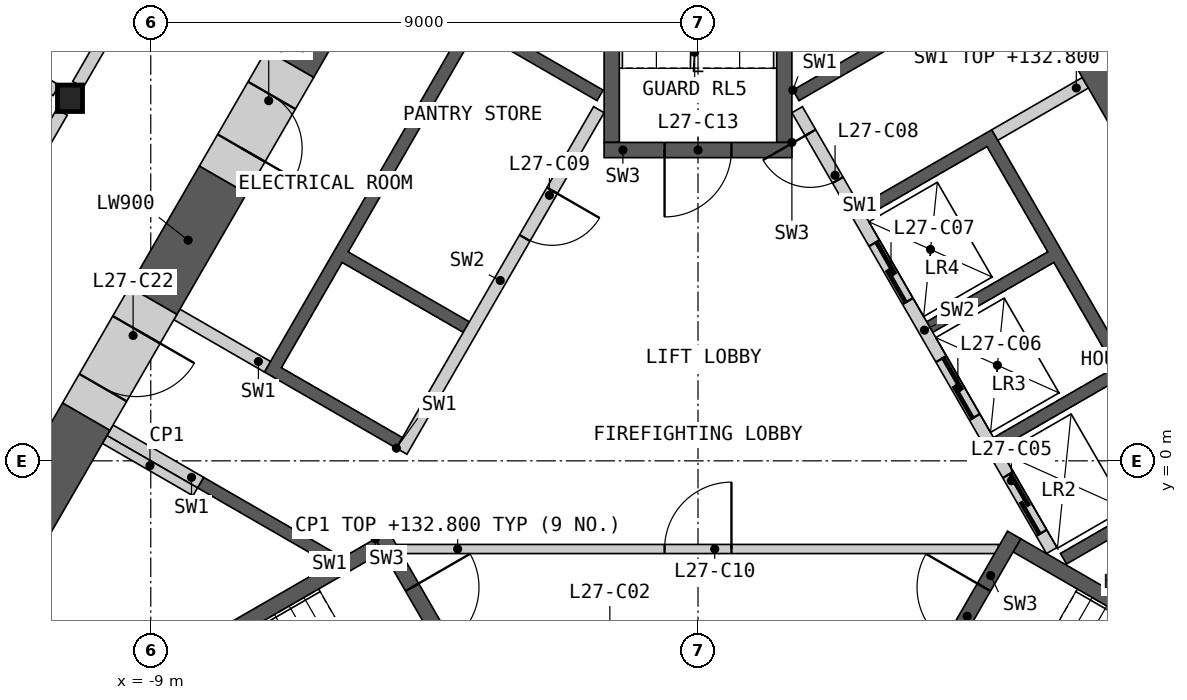
"""IFC4 building model, lengths in metres.
Left out: names, types, materials, properties, quantities, classifications, styles, units other than length and angle.
Written with IfcOpenShell. Run it as: python <this file> out.ifc"""

import sys

from ifc_helpers import new_model, si_unit, direction, frame, frame_2d, origin, origin_2d, place, context, subcontext, project, spatial, polyline, rectangle, i_section, outline, extrude, element, fill, save


model = new_model("IFC4")
c1 = context("Model", 3, precision=1e-05, world=origin(), true_north=direction((0.0, 1.0)))
c2 = subcontext(c1, "Body", "Model", "MODEL_VIEW")
j1 = project(units=[si_unit("LENGTHUNIT", "METRE"), si_unit("PLANEANGLEUNIT", "RADIAN")], contexts=[c1])
p1 = place(None, origin())
s1 = spatial("IfcSite", under=j1, at=p1, CompositionType="ELEMENT")
p2 = place(p1, origin())
s2 = spatial("IfcBuilding", under=s1, at=p2, CompositionType="ELEMENT")
p3 = place(p2, frame((0.0, 0.0, 129.0)))
s3 = spatial("IfcBuildingStorey", under=s2, at=p3, CompositionType="ELEMENT", Elevation=129.0)
p4 = place(p3, frame((-10.328, 5.963, 0.0), z_axis=(0.0, 0.0, 1.0), x_axis=(1.0, 0.0, 0.0)))
e1 = element("IfcColumn", 1, at=p4, inside=s3, PredefinedType="COLUMN", context=c2, shape_type="SweptSolid", body=[
    extrude(i_section(OverallWidth=0.412, OverallDepth=0.435, WebThickness=0.036, FlangeThickness=0.057, at=origin_2d()), origin(), (0.0, 0.0, 1.0), 4.2),
])
p5 = place(p3, origin())
e2 = element("IfcWall", 2, at=p5, inside=s3, PredefinedType="SHEAR", context=c2, shape_type="SweptSolid", body=[
    extrude(outline(polyline([(1.561, 6.097), (3.731, 7.35), (3.831, 7.177), (1.66, 5.924), (1.561, 6.097)])), origin(), (0.0, 0.0, 1.0), 3.8),
])
p6 = place(p3, origin())
e3 = element("IfcWall", 3, at=p6, inside=s3, PredefinedType="SHEAR", context=c2, shape_type="SweptSolid", body=[
    extrude(outline(polyline([(2.66, 4.192), (4.831, 5.445), (8.231, -0.444), (6.061, -1.697), (5.96, -1.524), (7.952, -0.374), (6.952, 1.358), (4.96, 0.208), (4.861, 0.381), (6.852, 1.531), (5.852, 3.263), (3.861, 2.113), (3.76, 2.287), (5.752, 3.437), (4.752, 5.169), (2.76, 4.019), (2.66, 4.192)])), origin(), (0.0, 0.0, 1.0), 3.8),
])
p7 = place(p3, frame((5.817, -1.476, 0.0), z_axis=(0.0, 0.0, 1.0), x_axis=(-0.500002616675, 0.866023893041, 0.0)))
e4 = element("IfcWall", 4, at=p7, inside=s3, PredefinedType="SOLIDWALL", context=c2, shape_type="SweptSolid", body=[
    extrude(rectangle(XDim=8.373, YDim=0.2, at=frame_2d((4.187, 0.0))), origin(), (0.0, 0.0, 1.0), 3.8),
])
p8 = place(p7, frame((0.337, 0.0, 0.0)))
e5 = element("IfcOpeningElement", 5, at=p8, cuts=e4, PredefinedType="OPENING", context=c2, shape_type="SweptSolid", body=[
    extrude(rectangle(XDim=1.1, YDim=2.1, at=frame_2d((0.55, 1.05))), frame((0.0, 0.11, 0.0), z_axis=(0.0, -1.0, 0.0), x_axis=(1.0, 0.0, 0.0)), (0.0, 0.0, 1.0), 0.22),
])
p9 = place(p7, frame((2.537, 0.0, 0.0)))
e6 = element("IfcOpeningElement", 6, at=p9, cuts=e4, PredefinedType="OPENING", context=c2, shape_type="SweptSolid", body=[
    extrude(rectangle(XDim=1.1, YDim=2.1, at=frame_2d((0.55, 1.05))), frame((0.0, 0.11, 0.0), z_axis=(0.0, -1.0, 0.0), x_axis=(1.0, 0.0, 0.0)), (0.0, 0.0, 1.0), 0.22),
])
p10 = place(p7, frame((4.737, 0.0, 0.0)))
e7 = element("IfcOpeningElement", 7, at=p10, cuts=e4, PredefinedType="OPENING", context=c2, shape_type="SweptSolid", body=[
    extrude(rectangle(XDim=1.1, YDim=2.1, at=frame_2d((0.55, 1.05))), frame((0.0, 0.11, 0.0), z_axis=(0.0, -1.0, 0.0), x_axis=(1.0, 0.0, 0.0)), (0.0, 0.0, 1.0), 0.22),
])
p11 = place(p7, frame((7.037, 0.0, 0.0)))
e8 = element("IfcOpeningElement", 8, at=p11, cuts=e4, PredefinedType="OPENING", context=c2, shape_type="SweptSolid", body=[
    extrude(rectangle(XDim=0.9, YDim=2.1, at=frame_2d((0.45, 1.05))), frame((0.0, 0.11, 0.0), z_axis=(0.0, -1.0, 0.0), x_axis=(1.0, 0.0, 0.0)), (0.0, 0.0, 1.0), 0.22),
])
p12 = place(p3, frame((4.881, 5.358, 0.0), z_axis=(0.0, 0.0, 1.0), x_axis=(0.866024871741, 0.500000921525, 0.0)))
e9 = element("IfcWall", 9, at=p12, inside=s3, PredefinedType="SHEAR", context=c2, shape_type="SweptSolid", body=[
    extrude(rectangle(XDim=1.72, YDim=0.2, at=frame_2d((0.86, 0.0))), origin(), (0.0, 0.0, 1.0), 3.8),
])
p13 = place(p3, origin())
e10 = element("IfcWall", 10, at=p13, inside=s3, PredefinedType="SHEAR", context=c2, shape_type="SweptSolid", body=[
    extrude(outline(polyline([(-6.061, -1.697), (-8.231, -0.444), (-8.131, -0.271), (-5.96, -1.524), (-6.061, -1.697)])), origin(), (0.0, 0.0, 1.0), 3.8),
])
p14 = place(p3, origin())
e11 = element("IfcWall", 11, at=p14, inside=s3, PredefinedType="SHEAR", context=c2, shape_type="SweptSolid", body=[
    extrude(outline(polyline([(-4.96, 0.208), (-7.131, 1.461), (-3.731, 7.35), (-1.561, 6.097), (-1.66, 5.924), (-3.652, 7.074), (-5.752, 3.437), (-3.76, 2.287), (-3.861, 2.113), (-5.852, 3.263), (-6.852, 1.531), (-4.861, 0.381), (-4.96, 0.208)])), origin(), (0.0, 0.0, 1.0), 3.8),
])
p15 = place(p3, frame((-1.631, 5.776, 0.0), z_axis=(0.0, 0.0, 1.0), x_axis=(-0.499992876559, -0.866029516466, 0.0)))
e12 = element("IfcWall", 12, at=p15, inside=s3, PredefinedType="SOLIDWALL", context=c2, shape_type="SweptSolid", body=[
    extrude(rectangle(XDim=6.486, YDim=0.2, at=frame_2d((3.243, 0.0))), origin(), (0.0, 0.0, 1.0), 3.8),
])
p16 = place(p15, frame((1.537, 0.0, 0.0)))
e13 = element("IfcOpeningElement", 13, at=p16, cuts=e12, PredefinedType="OPENING", context=c2, shape_type="SweptSolid", body=[
    extrude(rectangle(XDim=0.9, YDim=2.1, at=frame_2d((0.45, 1.05))), frame((0.0, 0.11, 0.0), z_axis=(0.0, -1.0, 0.0), x_axis=(1.0, 0.0, 0.0)), (0.0, 0.0, 1.0), 0.22),
])
for number, where, z_axis, x_axis in (
    (14, (-7.081, 1.548, 0.0), (0.0, 0.0, 1.0), (-0.866, 0.5, 0.0)),
    (15, (-8.181, -0.357, 0.0), (0.0, 0.0, 1.0), (-0.866, 0.5, 0.0)),
):
    element("IfcWall", number, at=place(p3, frame(where, z_axis=z_axis, x_axis=x_axis)), inside=s3, PredefinedType="SHEAR", context=c2, shape_type="SweptSolid", body=[
        extrude(rectangle(XDim=1.72, YDim=0.2, at=frame_2d((0.86, 0.0))), origin(), (0.0, 0.0, 1.0), 3.8),
    ])
p17 = place(p3, frame((-4.941, -1.45, 0.0), z_axis=(0.0, 0.0, 1.0), x_axis=(1.0, 0.0, 0.0)))
e16 = element("IfcWall", 16, at=p17, inside=s3, PredefinedType="PARTITIONING", context=c2, shape_type="SweptSolid", body=[
    extrude(rectangle(XDim=9.882, YDim=0.15, at=frame_2d((4.941, 0.0))), origin(), (0.0, 0.0, 1.0), 3.8),
])
p18 = place(p17, frame((4.391, 0.0, 0.0)))
e17 = element("IfcOpeningElement", 17, at=p18, cuts=e16, PredefinedType="OPENING", context=c2, shape_type="SweptSolid", body=[
    extrude(rectangle(XDim=1.1, YDim=2.1, at=frame_2d((0.55, 1.05))), frame((0.0, 0.085, 0.0), z_axis=(0.0, -1.0, 0.0), x_axis=(1.0, 0.0, 0.0)), (0.0, 0.0, 1.0), 0.17),
])
p19 = place(p3, origin())
e18 = element("IfcWall", 18, at=p19, inside=s3, PredefinedType="SHEAR", context=c2, shape_type="SweptSolid", body=[
    extrude(outline(polyline([(-5.307, -1.281), (-10.374, -4.206), (-10.032, -4.298), (-5.182, -1.498), (-5.307, -1.281)])), origin(), (0.0, 0.0, 1.0), 3.8),
])
p20 = place(p3, frame((-5.199, -1.219, 0.0), z_axis=(0.0, 0.0, 1.0), x_axis=(0.499982516597, -0.866035497597, 0.0)))
e19 = element("IfcWall", 19, at=p20, inside=s3, PredefinedType="SHEAR", context=c2, shape_type="SweptSolid", body=[
    extrude(rectangle(XDim=3.088, YDim=0.25, at=frame_2d((1.544, 0.0))), origin(), (0.0, 0.0, 1.0), 3.8),
])
p21 = place(p20, frame((0.994, 0.0, 0.0)))
e20 = element("IfcOpeningElement", 20, at=p21, cuts=e19, PredefinedType="OPENING", context=c2, shape_type="SweptSolid", body=[
    extrude(rectangle(XDim=1.1, YDim=2.1, at=frame_2d((0.55, 1.05))), frame((0.0, 0.135, 0.0), z_axis=(0.0, -1.0, 0.0), x_axis=(1.0, 0.0, 0.0)), (0.0, 0.0, 1.0), 0.27),
])
p22 = place(p3, origin())
e21 = element("IfcWall", 21, at=p22, inside=s3, PredefinedType="SHEAR", context=c2, shape_type="SweptSolid", body=[
    extrude(outline(polyline([(10.032, -4.298), (10.374, -4.206), (5.307, -1.281), (5.182, -1.498), (10.032, -4.298)])), origin(), (0.0, 0.0, 1.0), 3.8),
])
p23 = place(p3, frame((3.655, -3.893, 0.0), z_axis=(0.0, 0.0, 1.0), x_axis=(0.499982516597, 0.866035497597, 0.0)))
e22 = element("IfcWall", 22, at=p23, inside=s3, PredefinedType="SHEAR", context=c2, shape_type="SweptSolid", body=[
    extrude(rectangle(XDim=3.088, YDim=0.25, at=frame_2d((1.544, 0.0))), origin(), (0.0, 0.0, 1.0), 3.8),
])
p24 = place(p23, frame((0.994, 0.0, 0.0)))
e23 = element("IfcOpeningElement", 23, at=p24, cuts=e22, PredefinedType="OPENING", context=c2, shape_type="SweptSolid", body=[
    extrude(rectangle(XDim=1.1, YDim=2.1, at=frame_2d((0.55, 1.05))), frame((0.0, 0.135, 0.0), z_axis=(0.0, -1.0, 0.0), x_axis=(1.0, 0.0, 0.0)), (0.0, 0.0, 1.0), 0.27),
])
p25 = place(p3, origin())
e24 = element("IfcWall", 24, at=p25, inside=s3, PredefinedType="SHEAR", context=c2, shape_type="SweptSolid", body=[
    extrude(outline(polyline([(1.544, 5.237), (1.544, 11.087), (1.294, 10.837), (1.294, 5.237), (1.544, 5.237)])), origin(), (0.0, 0.0, 1.0), 3.8),
])
p26 = place(p3, origin())
e25 = element("IfcWall", 25, at=p26, inside=s3, PredefinedType="SHEAR", context=c2, shape_type="SweptSolid", body=[
    extrude(outline(polyline([(-1.294, 10.837), (-1.544, 11.087), (-1.544, 5.237), (-1.294, 5.237), (-1.294, 10.837)])), origin(), (0.0, 0.0, 1.0), 3.8),
])
p27 = place(p3, frame((1.544, 5.112, 0.0), z_axis=(0.0, 0.0, 1.0), x_axis=(-1.0, 0.0, 0.0)))
e26 = element("IfcWall", 26, at=p27, inside=s3, PredefinedType="SHEAR", context=c2, shape_type="SweptSolid", body=[
    extrude(rectangle(XDim=3.088, YDim=0.25, at=frame_2d((1.544, 0.0))), origin(), (0.0, 0.0, 1.0), 3.8),
])
p28 = place(p27, frame((0.994, 0.0, 0.0)))
e27 = element("IfcOpeningElement", 27, at=p28, cuts=e26, PredefinedType="OPENING", context=c2, shape_type="SweptSolid", body=[
    extrude(rectangle(XDim=1.1, YDim=2.1, at=frame_2d((0.55, 1.05))), frame((0.0, 0.135, 0.0), z_axis=(0.0, -1.0, 0.0), x_axis=(1.0, 0.0, 0.0)), (0.0, 0.0, 1.0), 0.27),
])
p29 = place(p3, frame((-8.268, -0.509, 0.0), z_axis=(0.0, 0.0, 1.0), x_axis=(-0.866024871741, 0.500000921525, 0.0)))
e28 = element("IfcWall", 28, at=p29, inside=s3, PredefinedType="PARTITIONING", context=c2, shape_type="SweptSolid", body=[
    extrude(rectangle(XDim=1.72, YDim=0.15, at=frame_2d((0.86, 0.0))), origin(), (0.0, 0.0, 1.0), 3.8),
])
p30 = place(p3, frame((7.91, 4.451, 0.0), z_axis=(0.0, 0.0, 1.0), x_axis=(-0.500001962043, 0.866024270995, 0.0)))
e29 = element("IfcWall", 29, at=p30, inside=s3, PredefinedType="SHEAR", context=c2, shape_type="SweptSolid", body=[
    extrude(rectangle(XDim=8.796, YDim=0.9, at=frame_2d((4.398, 0.0))), origin(), (0.0, 0.0, 1.0), 3.8),
])
p31 = place(p3, frame((-10.06, 0.728, 0.0), z_axis=(0.0, 0.0, 1.0), x_axis=(-0.499996331799, -0.866027521611, 0.0)))
e30 = element("IfcWall", 30, at=p31, inside=s3, PredefinedType="SHEAR", context=c2, shape_type="SweptSolid", body=[
    extrude(rectangle(XDim=4.295, YDim=0.9, at=frame_2d((2.148, 0.0))), origin(), (0.0, 0.0, 1.0), 3.8),
])
p32 = place(p3, frame((-5.332, 8.917, 0.0), z_axis=(0.0, 0.0, 1.0), x_axis=(-0.499949934511, -0.866054307178, 0.0)))
e31 = element("IfcWall", 31, at=p32, inside=s3, PredefinedType="SHEAR", context=c2, shape_type="SweptSolid", body=[
    extrude(rectangle(XDim=2.756, YDim=0.9, at=frame_2d((1.378, 0.0))), origin(), (0.0, 0.0, 1.0), 3.8),
])
p33 = place(p3, frame((-7.81, 4.625, 0.0), z_axis=(0.0, 0.0, 1.0), x_axis=(-0.499952165731, -0.866053019151, 0.0)))
e32 = element("IfcWall", 32, at=p33, inside=s3, PredefinedType="SHEAR", context=c2, shape_type="SweptSolid", body=[
    extrude(rectangle(XDim=2.3, YDim=0.9, at=frame_2d((1.15, 0.0))), origin(), (0.0, 0.0, 1.0), 3.8),
])
p34 = place(p3, frame((-6.71, 6.53, 0.0), z_axis=(0.0, 0.0, 1.0), x_axis=(-0.50002983664, -0.866008176907, 0.0)))
e33 = element("IfcWall", 33, at=p34, inside=s3, PredefinedType="SHEAR", context=c2, shape_type="SweptSolid", body=[
    extrude(rectangle(XDim=2.2, YDim=0.9, at=frame_2d((1.1, 0.0))), origin(), (0.0, 0.0, 1.0), 3.8),
])
p35 = place(p34, frame((0.6, 0.0, 0.0)))
e34 = element("IfcOpeningElement", 34, at=p35, cuts=e33, PredefinedType="OPENING", context=c2, shape_type="SweptSolid", body=[
    extrude(rectangle(XDim=1.0, YDim=2.1, at=frame_2d((0.5, 1.05))), frame((0.0, 0.46, 0.0), z_axis=(0.0, -1.0, 0.0), x_axis=(1.0, 0.0, 0.0)), (0.0, 0.0, 1.0), 0.92),
])
p36 = place(p3, frame((-8.96, 2.633, 0.0), z_axis=(0.0, 0.0, 1.0), x_axis=(-0.50002983664, -0.866008176907, 0.0)))
e35 = element("IfcWall", 35, at=p36, inside=s3, PredefinedType="SHEAR", context=c2, shape_type="SweptSolid", body=[
    extrude(rectangle(XDim=2.2, YDim=0.9, at=frame_2d((1.1, 0.0))), origin(), (0.0, 0.0, 1.0), 3.8),
])
p37 = place(p36, frame((0.55, 0.0, 0.0)))
e36 = element("IfcOpeningElement", 36, at=p37, cuts=e35, PredefinedType="OPENING", context=c2, shape_type="SweptSolid", body=[
    extrude(rectangle(XDim=1.1, YDim=2.1, at=frame_2d((0.55, 1.05))), frame((0.0, 0.46, 0.0), z_axis=(0.0, -1.0, 0.0), x_axis=(1.0, 0.0, 0.0)), (0.0, 0.0, 1.0), 0.92),
])
p38 = place(p3, frame((-15.361, -2.754, 0.0), z_axis=(0.0, 0.0, 1.0), x_axis=(0.500004141693, 0.866023012564, 0.0)))
e37 = element("IfcWall", 37, at=p38, inside=s3, PredefinedType="PARTITIONING", context=c2, shape_type="SweptSolid", body=[
    extrude(rectangle(XDim=9.803, YDim=0.2, at=frame_2d((4.902, 0.0))), origin(), (0.0, 0.0, 1.0), 3.8),
])
p39 = place(p38, frame((4.452, 0.0, 0.0)))
e38 = element("IfcOpeningElement", 38, at=p39, cuts=e37, PredefinedType="OPENING", context=c2, shape_type="SweptSolid", body=[
    extrude(rectangle(XDim=1.0, YDim=2.1, at=frame_2d((0.5, 1.05))), frame((0.0, 0.11, 0.0), z_axis=(0.0, -1.0, 0.0), x_axis=(1.0, 0.0, 0.0)), (0.0, 0.0, 1.0), 0.22),
])
p40 = place(p3, frame((5.295, 14.68, 0.0), z_axis=(0.0, 0.0, 1.0), x_axis=(0.500012035596, -0.866018454918, 0.0)))
e39 = element("IfcWall", 39, at=p40, inside=s3, PredefinedType="PARTITIONING", context=c2, shape_type="SweptSolid", body=[
    extrude(rectangle(XDim=9.803, YDim=0.2, at=frame_2d((4.902, 0.0))), origin(), (0.0, 0.0, 1.0), 3.8),
])
p41 = place(p40, frame((4.052, 0.0, 0.0)))
e40 = element("IfcOpeningElement", 40, at=p41, cuts=e39, PredefinedType="OPENING", context=c2, shape_type="SweptSolid", body=[
    extrude(rectangle(XDim=1.8, YDim=2.1, at=frame_2d((0.9, 1.05))), frame((0.0, 0.11, 0.0), z_axis=(0.0, -1.0, 0.0), x_axis=(1.0, 0.0, 0.0)), (0.0, 0.0, 1.0), 0.22),
])
p42 = place(p3, frame((-10.197, 6.19, 0.0), z_axis=(0.0, 0.0, 1.0), x_axis=(0.500012035596, 0.866018454918, 0.0)))
e41 = element("IfcWall", 41, at=p42, inside=s3, PredefinedType="PARTITIONING", context=c2, shape_type="SweptSolid", body=[
    extrude(rectangle(XDim=9.803, YDim=0.2, at=frame_2d((4.902, 0.0))), origin(), (0.0, 0.0, 1.0), 3.8),
])
p43 = place(p42, frame((4.452, 0.0, 0.0)))
e42 = element("IfcOpeningElement", 42, at=p43, cuts=e41, PredefinedType="OPENING", context=c2, shape_type="SweptSolid", body=[
    extrude(rectangle(XDim=1.0, YDim=2.1, at=frame_2d((0.5, 1.05))), frame((0.0, 0.11, 0.0), z_axis=(0.0, -1.0, 0.0), x_axis=(1.0, 0.0, 0.0)), (0.0, 0.0, 1.0), 0.22),
])
p44 = place(p3, frame((-21.536, 12.434, 0.0), z_axis=(0.0, 0.0, 1.0), x_axis=(0.86602461759, -0.500001361726, 0.0)))
e43 = element("IfcWall", 43, at=p44, inside=s3, PredefinedType="PARTITIONING", context=c2, shape_type="SweptSolid", body=[
    extrude(rectangle(XDim=12.679, YDim=0.2, at=frame_2d((6.34, 0.0))), origin(), (0.0, 0.0, 1.0), 2.885),
])
p45 = place(p8, origin())
e44 = element("IfcDoor", 44, at=p45, inside=s3, OperationType="SLIDING_TO_LEFT", PredefinedType="DOOR", context=c2, shape_type="SweptSolid", body=[
    extrude(rectangle(XDim=1.1, YDim=2.1, at=frame_2d((0.55, 1.05))), frame((0.0, 0.025, 0.0), z_axis=(0.0, -1.0, 0.0), x_axis=(1.0, 0.0, 0.0)), (0.0, 0.0, 1.0), 0.05),
])
fill(e5, e44)
p46 = place(p9, origin())
e45 = element("IfcDoor", 45, at=p46, inside=s3, OperationType="SLIDING_TO_LEFT", PredefinedType="DOOR", context=c2, shape_type="SweptSolid", body=[
    extrude(rectangle(XDim=1.1, YDim=2.1, at=frame_2d((0.55, 1.05))), frame((0.0, 0.025, 0.0), z_axis=(0.0, -1.0, 0.0), x_axis=(1.0, 0.0, 0.0)), (0.0, 0.0, 1.0), 0.05),
])
fill(e6, e45)
p47 = place(p10, origin())
e46 = element("IfcDoor", 46, at=p47, inside=s3, OperationType="SLIDING_TO_LEFT", PredefinedType="DOOR", context=c2, shape_type="SweptSolid", body=[
    extrude(rectangle(XDim=1.1, YDim=2.1, at=frame_2d((0.55, 1.05))), frame((0.0, 0.025, 0.0), z_axis=(0.0, -1.0, 0.0), x_axis=(1.0, 0.0, 0.0)), (0.0, 0.0, 1.0), 0.05),
])
fill(e7, e46)
p48 = place(p11, origin())
e47 = element("IfcDoor", 47, at=p48, inside=s3, OperationType="SINGLE_SWING_RIGHT", PredefinedType="DOOR", context=c2, shape_type="SweptSolid", body=[
    extrude(rectangle(XDim=0.9, YDim=2.1, at=frame_2d((0.45, 1.05))), frame((0.0, 0.025, 0.0), z_axis=(0.0, -1.0, 0.0), x_axis=(1.0, 0.0, 0.0)), (0.0, 0.0, 1.0), 0.05),
])
fill(e8, e47)
p49 = place(p16, origin())
e48 = element("IfcDoor", 48, at=p49, inside=s3, OperationType="SINGLE_SWING_LEFT", PredefinedType="DOOR", context=c2, shape_type="SweptSolid", body=[
    extrude(rectangle(XDim=0.9, YDim=2.1, at=frame_2d((0.45, 1.05))), frame((0.0, 0.025, 0.0), z_axis=(0.0, -1.0, 0.0), x_axis=(1.0, 0.0, 0.0)), (0.0, 0.0, 1.0), 0.05),
])
fill(e13, e48)
p50 = place(p18, origin())
e49 = element("IfcDoor", 49, at=p50, inside=s3, OperationType="SINGLE_SWING_RIGHT", PredefinedType="DOOR", context=c2, shape_type="SweptSolid", body=[
    extrude(rectangle(XDim=1.1, YDim=2.1, at=frame_2d((0.55, 1.05))), frame((0.0, 0.025, 0.0), z_axis=(0.0, -1.0, 0.0), x_axis=(1.0, 0.0, 0.0)), (0.0, 0.0, 1.0), 0.05),
])
fill(e17, e49)
p51 = place(p21, origin())
e50 = element("IfcDoor", 50, at=p51, inside=s3, OperationType="SINGLE_SWING_LEFT", PredefinedType="DOOR", context=c2, shape_type="SweptSolid", body=[
    extrude(rectangle(XDim=1.1, YDim=2.1, at=frame_2d((0.55, 1.05))), frame((0.0, 0.025, 0.0), z_axis=(0.0, -1.0, 0.0), x_axis=(1.0, 0.0, 0.0)), (0.0, 0.0, 1.0), 0.05),
])
fill(e20, e50)
p52 = place(p24, origin())
e51 = element("IfcDoor", 51, at=p52, inside=s3, OperationType="SINGLE_SWING_RIGHT", PredefinedType="DOOR", context=c2, shape_type="SweptSolid", body=[
    extrude(rectangle(XDim=1.1, YDim=2.1, at=frame_2d((0.55, 1.05))), frame((0.0, 0.025, 0.0), z_axis=(0.0, -1.0, 0.0), x_axis=(1.0, 0.0, 0.0)), (0.0, 0.0, 1.0), 0.05),
])
fill(e23, e51)
p53 = place(p28, origin())
e52 = element("IfcDoor", 52, at=p53, inside=s3, OperationType="SINGLE_SWING_RIGHT", PredefinedType="DOOR", context=c2, shape_type="SweptSolid", body=[
    extrude(rectangle(XDim=1.1, YDim=2.1, at=frame_2d((0.55, 1.05))), frame((0.0, 0.025, 0.0), z_axis=(0.0, -1.0, 0.0), x_axis=(1.0, 0.0, 0.0)), (0.0, 0.0, 1.0), 0.05),
])
fill(e27, e52)
p54 = place(p35, origin())
e53 = element("IfcDoor", 53, at=p54, inside=s3, OperationType="SINGLE_SWING_RIGHT", PredefinedType="DOOR", context=c2, shape_type="SweptSolid", body=[
    extrude(rectangle(XDim=1.0, YDim=2.1, at=frame_2d((0.5, 1.05))), frame((0.0, 0.205, 0.0), z_axis=(0.0, -1.0, 0.0), x_axis=(1.0, 0.0, 0.0)), (0.0, 0.0, 1.0), 0.05),
])
fill(e34, e53)
p55 = place(p37, origin())
e54 = element("IfcDoor", 54, at=p55, inside=s3, OperationType="SINGLE_SWING_LEFT", PredefinedType="DOOR", context=c2, shape_type="SweptSolid", body=[
    extrude(rectangle(XDim=1.1, YDim=2.1, at=frame_2d((0.55, 1.05))), frame((0.0, 0.205, 0.0), z_axis=(0.0, -1.0, 0.0), x_axis=(1.0, 0.0, 0.0)), (0.0, 0.0, 1.0), 0.05),
])
fill(e36, e54)
save(model, sys.argv[1])
